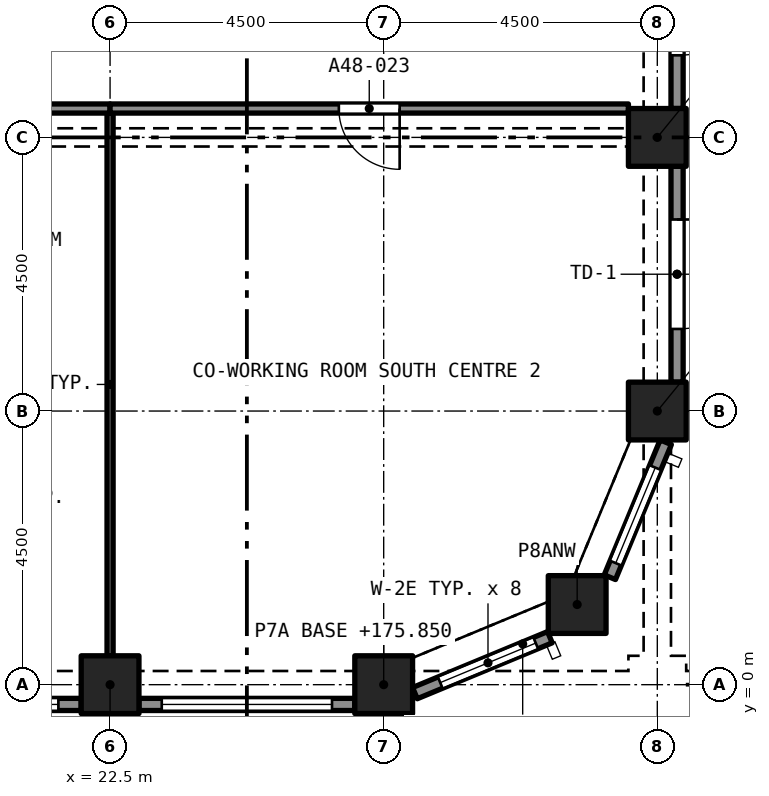
"""IFC4 building model, lengths in metres.
Left out: names, types, materials, properties, quantities, classifications, styles, units other than length and angle.
Written with IfcOpenShell. Run it as: python <this file> out.ifc"""

import sys

from ifc_helpers import new_model, si_unit, direction, frame, frame_2d, origin, origin_2d, place, context, subcontext, project, spatial, rectangle, extrude, element, fill, save


model = new_model("IFC4")
c1 = context("Model", 3, precision=1e-05, world=origin(), true_north=direction((0.0, 1.0)))
c2 = subcontext(c1, "Body", "Model", "MODEL_VIEW")
j1 = project(units=[si_unit("LENGTHUNIT", "METRE"), si_unit("PLANEANGLEUNIT", "RADIAN")], contexts=[c1])
p1 = place(None, origin())
s1 = spatial("IfcSite", under=j1, at=p1, CompositionType="ELEMENT")
p2 = place(p1, origin())
s2 = spatial("IfcBuilding", under=s1, at=p2, CompositionType="ELEMENT")
p3 = place(p2, frame((0.0, 0.0, 176.3)))
s3 = spatial("IfcBuildingStorey", under=s2, at=p3, CompositionType="ELEMENT", Elevation=176.3)
for number, where, z_axis, x_axis in (
    (1, (22.5, 0.0, -0.45), (0.0, 0.0, 1.0), (1.0, 0.0, 0.0)),
    (2, (27.0, 0.0, -0.45), (0.0, 0.0, 1.0), (1.0, 0.0, 0.0)),
):
    element("IfcColumn", number, at=place(p3, frame(where, z_axis=z_axis, x_axis=x_axis)), inside=s3, PredefinedType="COLUMN", context=c2, shape_type="SweptSolid", body=[
        extrude(rectangle(XDim=0.95, YDim=0.95, at=origin_2d()), origin(), (0.0, 0.0, 1.0), 3.65),
    ])
for number, where, z_axis, x_axis in (
    (3, (30.182, 1.318, 0.0), (0.0, 0.0, 1.0), (1.0, 0.0, 0.0)),
    (4, (31.5, 4.5, 0.0), (0.0, 0.0, 1.0), (1.0, 0.0, 0.0)),
    (5, (31.5, 9.0, 0.0), (0.0, 0.0, 1.0), (1.0, 0.0, 0.0)),
):
    element("IfcColumn", number, at=place(p3, frame(where, z_axis=z_axis, x_axis=x_axis)), inside=s3, PredefinedType="COLUMN", context=c2, shape_type="SweptSolid", body=[
        extrude(rectangle(XDim=0.95, YDim=0.95, at=origin_2d()), origin(), (0.0, 0.0, 1.0), 3.2),
    ])
p4 = place(p3, frame((29.733, 0.78, 0.0), z_axis=(0.0, 0.0, 1.0), x_axis=(-0.923880599843, -0.382680855588, 0.0)))
e6 = element("IfcWall", 6, at=p4, inside=s3, PredefinedType="SOLIDWALL", context=c2, shape_type="SweptSolid", body=[
    extrude(rectangle(XDim=2.403, YDim=0.2, at=frame_2d((1.201, 0.0))), origin(), (0.0, 0.0, 1.0), 3.2),
])
p5 = place(p4, frame((0.251, 0.0, 0.45)))
e7 = element("IfcOpeningElement", 7, at=p5, cuts=e6, PredefinedType="OPENING", context=c2, shape_type="SweptSolid", body=[
    extrude(rectangle(XDim=1.7, YDim=1.95, at=frame_2d((0.85, 0.975))), frame((0.0, 0.11, 0.0), z_axis=(0.0, -1.0, 0.0), x_axis=(1.0, 0.0, 0.0)), (0.0, 0.0, 1.0), 0.22),
])
p6 = place(p3, frame((31.639, 3.987, 0.0), z_axis=(0.0, 0.0, 1.0), x_axis=(-0.382680855588, -0.923880599843, 0.0)))
e8 = element("IfcWall", 8, at=p6, inside=s3, PredefinedType="SOLIDWALL", context=c2, shape_type="SweptSolid", body=[
    extrude(rectangle(XDim=2.403, YDim=0.2, at=frame_2d((1.201, 0.0))), origin(), (0.0, 0.0, 1.0), 3.2),
])
p7 = place(p6, frame((0.451, 0.0, 0.45)))
e9 = element("IfcOpeningElement", 9, at=p7, cuts=e8, PredefinedType="OPENING", context=c2, shape_type="SweptSolid", body=[
    extrude(rectangle(XDim=1.7, YDim=1.95, at=frame_2d((0.85, 0.975))), frame((0.0, 0.11, 0.0), z_axis=(0.0, -1.0, 0.0), x_axis=(1.0, 0.0, 0.0)), (0.0, 0.0, 1.0), 0.22),
])
p8 = place(p3, frame((31.825, 8.525, 0.0), z_axis=(0.0, 0.0, 1.0), x_axis=(0.0, -1.0, 0.0)))
e10 = element("IfcWall", 10, at=p8, inside=s3, PredefinedType="SOLIDWALL", context=c2, shape_type="SweptSolid", body=[
    extrude(rectangle(XDim=3.55, YDim=0.2, at=frame_2d((1.775, 0.0))), origin(), (0.0, 0.0, 1.0), 3.2),
])
p9 = place(p8, frame((0.875, 0.0, 0.0)))
e11 = element("IfcOpeningElement", 11, at=p9, cuts=e10, PredefinedType="OPENING", context=c2, shape_type="SweptSolid", body=[
    extrude(rectangle(XDim=1.8, YDim=2.4, at=frame_2d((0.9, 1.2))), frame((0.0, 0.11, 0.0), z_axis=(0.0, -1.0, 0.0), x_axis=(1.0, 0.0, 0.0)), (0.0, 0.0, 1.0), 0.22),
])
p10 = place(p3, frame((31.825, 13.025, 0.0), z_axis=(0.0, 0.0, 1.0), x_axis=(0.0, -1.0, 0.0)))
e12 = element("IfcWall", 12, at=p10, inside=s3, PredefinedType="SOLIDWALL", context=c2, shape_type="SweptSolid", body=[
    extrude(rectangle(XDim=3.55, YDim=0.2, at=frame_2d((1.775, 0.0))), origin(), (0.0, 0.0, 1.0), 3.2),
])
p11 = place(p10, frame((0.875, 0.0, 0.0)))
e13 = element("IfcOpeningElement", 13, at=p11, cuts=e12, PredefinedType="OPENING", context=c2, shape_type="SweptSolid", body=[
    extrude(rectangle(XDim=1.8, YDim=2.4, at=frame_2d((0.9, 1.2))), frame((0.0, 0.11, 0.0), z_axis=(0.0, -1.0, 0.0), x_axis=(1.0, 0.0, 0.0)), (0.0, 0.0, 1.0), 0.22),
])
p12 = place(p3, frame((22.025, -0.325, 0.0), z_axis=(0.0, 0.0, 1.0), x_axis=(-1.0, 0.0, 0.0)))
e14 = element("IfcWall", 14, at=p12, inside=s3, PredefinedType="SOLIDWALL", context=c2, shape_type="SweptSolid", body=[
    extrude(rectangle(XDim=3.55, YDim=0.2, at=frame_2d((1.775, 0.0))), origin(), (0.0, 0.0, 1.0), 3.2),
])
p13 = place(p12, frame((0.375, 0.0, 0.45)))
e15 = element("IfcOpeningElement", 15, at=p13, cuts=e14, PredefinedType="OPENING", context=c2, shape_type="SweptSolid", body=[
    extrude(rectangle(XDim=2.8, YDim=1.95, at=frame_2d((1.4, 0.975))), frame((0.0, 0.11, 0.0), z_axis=(0.0, -1.0, 0.0), x_axis=(1.0, 0.0, 0.0)), (0.0, 0.0, 1.0), 0.22),
])
p14 = place(p3, frame((26.525, -0.325, 0.0), z_axis=(0.0, 0.0, 1.0), x_axis=(-1.0, 0.0, 0.0)))
e16 = element("IfcWall", 16, at=p14, inside=s3, PredefinedType="SOLIDWALL", context=c2, shape_type="SweptSolid", body=[
    extrude(rectangle(XDim=3.55, YDim=0.2, at=frame_2d((1.775, 0.0))), origin(), (0.0, 0.0, 1.0), 3.2),
])
p15 = place(p14, frame((0.375, 0.0, 0.45)))
e17 = element("IfcOpeningElement", 17, at=p15, cuts=e16, PredefinedType="OPENING", context=c2, shape_type="SweptSolid", body=[
    extrude(rectangle(XDim=2.8, YDim=1.95, at=frame_2d((1.4, 0.975))), frame((0.0, 0.11, 0.0), z_axis=(0.0, -1.0, 0.0), x_axis=(1.0, 0.0, 0.0)), (0.0, 0.0, 1.0), 0.22),
])
p16 = place(p3, frame((22.5, 0.475, 0.0), z_axis=(0.0, 0.0, 1.0), x_axis=(0.0, 1.0, 0.0)))
e18 = element("IfcWall", 18, at=p16, inside=s3, PredefinedType="PARTITIONING", context=c2, shape_type="SweptSolid", body=[
    extrude(rectangle(XDim=8.925, YDim=0.1, at=frame_2d((4.462, 0.0))), origin(), (0.0, 0.0, 1.0), 2.75),
])
p17 = place(p3, frame((22.5, 9.475, 0.0), z_axis=(0.0, 0.0, 1.0), x_axis=(-1.0, 0.0, 0.0)))
e19 = element("IfcWall", 19, at=p17, inside=s3, PredefinedType="PARTITIONING", context=c2, shape_type="SweptSolid", body=[
    extrude(rectangle(XDim=4.025, YDim=0.15, at=frame_2d((2.012, 0.0))), origin(), (0.0, 0.0, 1.0), 2.75),
])
p18 = place(p17, frame((1.75, 0.0, 0.0)))
e20 = element("IfcOpeningElement", 20, at=p18, cuts=e19, PredefinedType="OPENING", context=c2, shape_type="SweptSolid", body=[
    extrude(rectangle(XDim=1.0, YDim=2.1, at=frame_2d((0.5, 1.05))), frame((0.0, 0.085, 0.0), z_axis=(0.0, -1.0, 0.0), x_axis=(1.0, 0.0, 0.0)), (0.0, 0.0, 1.0), 0.17),
])
p19 = place(p3, frame((31.025, 9.475, 0.0), z_axis=(0.0, 0.0, 1.0), x_axis=(-1.0, 0.0, 0.0)))
e21 = element("IfcWall", 21, at=p19, inside=s3, PredefinedType="PARTITIONING", context=c2, shape_type="SweptSolid", body=[
    extrude(rectangle(XDim=8.525, YDim=0.15, at=frame_2d((4.262, 0.0))), origin(), (0.0, 0.0, 1.0), 2.75),
])
p20 = place(p19, frame((3.762, 0.0, 0.0)))
e22 = element("IfcOpeningElement", 22, at=p20, cuts=e21, PredefinedType="OPENING", context=c2, shape_type="SweptSolid", body=[
    extrude(rectangle(XDim=1.0, YDim=2.1, at=frame_2d((0.5, 1.05))), frame((0.0, 0.085, 0.0), z_axis=(0.0, -1.0, 0.0), x_axis=(1.0, 0.0, 0.0)), (0.0, 0.0, 1.0), 0.17),
])
p21 = place(p5, origin())
e23 = element("IfcWindow", 23, at=p21, inside=s3, PartitioningType="SINGLE_PANEL", PredefinedType="WINDOW", context=c2, shape_type="SweptSolid", body=[
    extrude(rectangle(XDim=1.7, YDim=1.95, at=frame_2d((0.85, 0.975))), frame((0.0, 0.03, 0.0), z_axis=(0.0, -1.0, 0.0), x_axis=(1.0, 0.0, 0.0)), (0.0, 0.0, 1.0), 0.06),
])
fill(e7, e23)
p22 = place(p7, origin())
e24 = element("IfcWindow", 24, at=p22, inside=s3, PartitioningType="SINGLE_PANEL", PredefinedType="WINDOW", context=c2, shape_type="SweptSolid", body=[
    extrude(rectangle(XDim=1.7, YDim=1.95, at=frame_2d((0.85, 0.975))), frame((0.0, 0.03, 0.0), z_axis=(0.0, -1.0, 0.0), x_axis=(1.0, 0.0, 0.0)), (0.0, 0.0, 1.0), 0.06),
])
fill(e9, e24)
p23 = place(p13, origin())
e25 = element("IfcWindow", 25, at=p23, inside=s3, PartitioningType="SINGLE_PANEL", PredefinedType="WINDOW", context=c2, shape_type="SweptSolid", body=[
    extrude(rectangle(XDim=2.8, YDim=1.95, at=frame_2d((1.4, 0.975))), frame((0.0, 0.03, 0.0), z_axis=(0.0, -1.0, 0.0), x_axis=(1.0, 0.0, 0.0)), (0.0, 0.0, 1.0), 0.06),
])
fill(e15, e25)
p24 = place(p15, origin())
e26 = element("IfcWindow", 26, at=p24, inside=s3, PartitioningType="SINGLE_PANEL", PredefinedType="WINDOW", context=c2, shape_type="SweptSolid", body=[
    extrude(rectangle(XDim=2.8, YDim=1.95, at=frame_2d((1.4, 0.975))), frame((0.0, 0.03, 0.0), z_axis=(0.0, -1.0, 0.0), x_axis=(1.0, 0.0, 0.0)), (0.0, 0.0, 1.0), 0.06),
])
fill(e17, e26)
p25 = place(p9, origin())
e27 = element("IfcDoor", 27, at=p25, inside=s3, OperationType="DOUBLE_DOOR_SINGLE_SWING", PredefinedType="DOOR", context=c2, shape_type="SweptSolid", body=[
    extrude(rectangle(XDim=1.8, YDim=2.4, at=frame_2d((0.9, 1.2))), frame((0.0, 0.025, 0.0), z_axis=(0.0, -1.0, 0.0), x_axis=(1.0, 0.0, 0.0)), (0.0, 0.0, 1.0), 0.05),
])
fill(e11, e27)
p26 = place(p11, origin())
e28 = element("IfcDoor", 28, at=p26, inside=s3, OperationType="DOUBLE_DOOR_SINGLE_SWING", PredefinedType="DOOR", context=c2, shape_type="SweptSolid", body=[
    extrude(rectangle(XDim=1.8, YDim=2.4, at=frame_2d((0.9, 1.2))), frame((0.0, 0.025, 0.0), z_axis=(0.0, -1.0, 0.0), x_axis=(1.0, 0.0, 0.0)), (0.0, 0.0, 1.0), 0.05),
])
fill(e13, e28)
p27 = place(p20, origin())
e29 = element("IfcDoor", 29, at=p27, inside=s3, OperationType="SINGLE_SWING_RIGHT", PredefinedType="DOOR", context=c2, shape_type="SweptSolid", body=[
    extrude(rectangle(XDim=1.0, YDim=2.1, at=frame_2d((0.5, 1.05))), frame((0.0, 0.025, 0.0), z_axis=(0.0, -1.0, 0.0), x_axis=(1.0, 0.0, 0.0)), (0.0, 0.0, 1.0), 0.05),
])
fill(e22, e29)
save(model, sys.argv[1])
